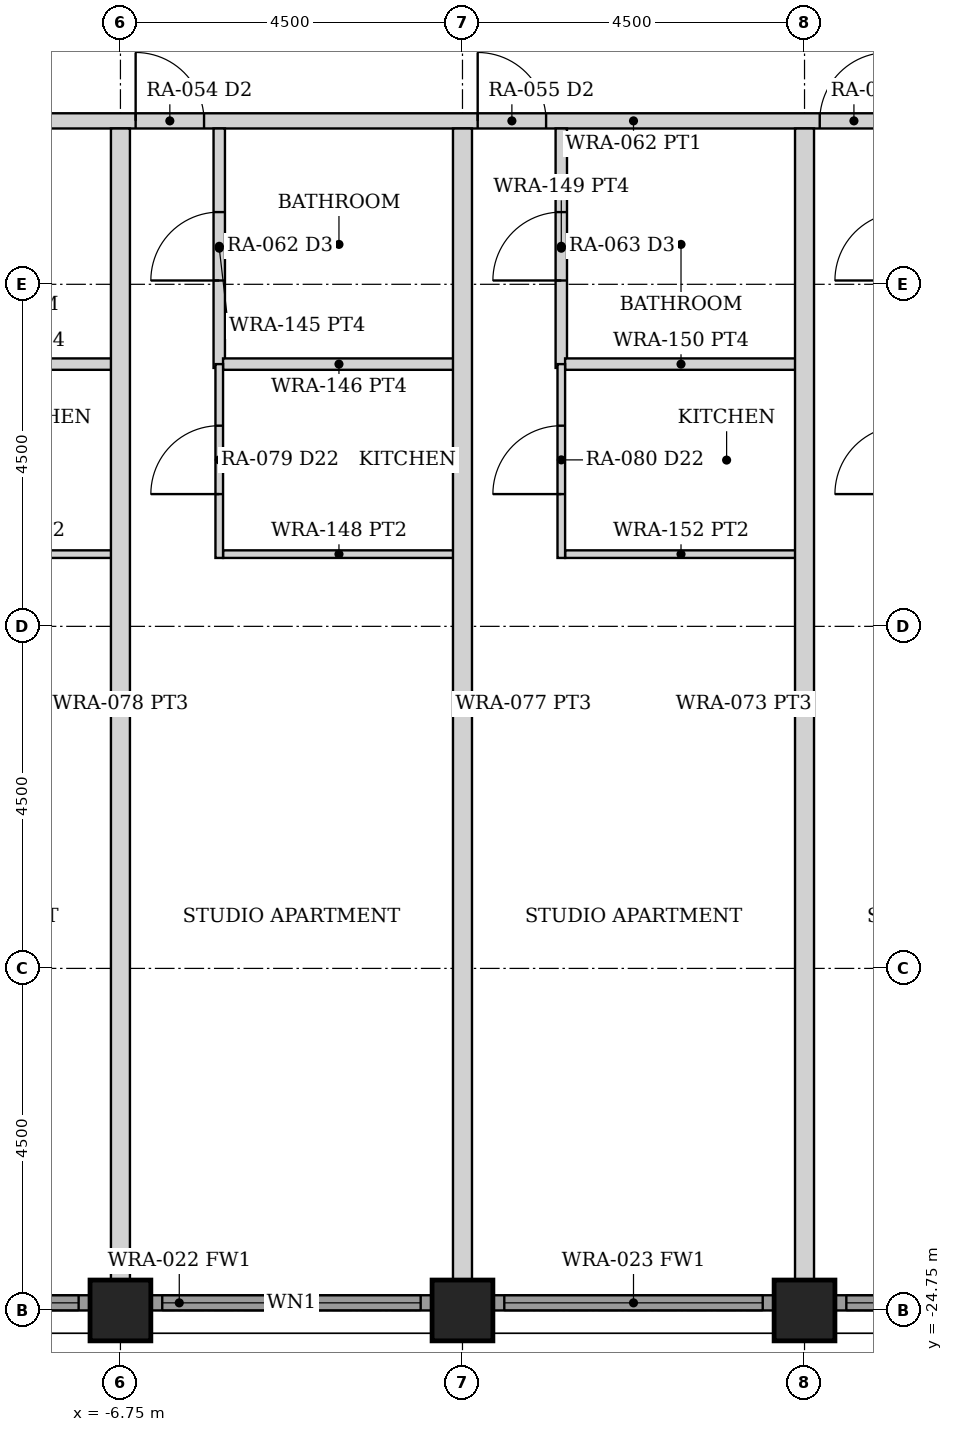
"""IFC4 building model, lengths in metres.
Left out: names, types, materials, properties, quantities, classifications, styles, units other than length and angle.
Written with IfcOpenShell. Run it as: python <this file> out.ifc"""

import sys

from ifc_helpers import new_model, si_unit, direction, frame, frame_2d, origin, origin_2d, place, context, subcontext, project, spatial, rectangle, hollow_rectangle, extrude, element, fill, save


model = new_model("IFC4")
c1 = context("Model", 3, precision=1e-05, world=origin(), true_north=direction((0.0, 1.0)))
c2 = subcontext(c1, "Body", "Model", "MODEL_VIEW")
j1 = project(units=[si_unit("LENGTHUNIT", "METRE"), si_unit("PLANEANGLEUNIT", "RADIAN")], contexts=[c1])
p1 = place(None, origin())
s1 = spatial("IfcSite", under=j1, at=p1, CompositionType="ELEMENT")
p2 = place(p1, origin())
s2 = spatial("IfcBuilding", under=s1, at=p2, CompositionType="ELEMENT")
p3 = place(p2, frame((0.0, 0.0, 26.5)))
s3 = spatial("IfcBuildingStorey", under=s2, at=p3, CompositionType="ELEMENT", Elevation=26.5)
for number, where, z_axis, x_axis in (
    (1, (-6.75, -24.75, 0.0), (0.0, 0.0, 1.0), (0.0, 1.0, 0.0)),
    (2, (-2.25, -24.75, 0.0), (0.0, 0.0, 1.0), (0.0, 1.0, 0.0)),
    (3, (2.25, -24.75, 0.0), (0.0, 0.0, 1.0), (0.0, 1.0, 0.0)),
):
    element("IfcColumn", number, at=place(p3, frame(where, z_axis=z_axis, x_axis=x_axis)), inside=s3, PredefinedType="COLUMN", context=c2, shape_type="SweptSolid", body=[
        extrude(hollow_rectangle(XDim=0.8, YDim=0.8, WallThickness=0.08, at=origin_2d()), origin(), (0.0, 0.0, 1.0), 3.5),
    ])
p4 = place(p3, frame((-10.845, -24.65, 0.0), z_axis=(0.0, 0.0, 1.0), x_axis=(1.0, 0.0, 0.0)))
e4 = element("IfcWall", 4, at=p4, inside=s3, PredefinedType="SOLIDWALL", context=c2, shape_type="SweptSolid", body=[
    extrude(rectangle(XDim=3.69, YDim=0.2, at=frame_2d((1.845, 0.0))), origin(), (0.0, 0.0, 1.0), 2.379),
])
p5 = place(p4, frame((0.145, 0.0, 0.3)))
e5 = element("IfcOpeningElement", 5, at=p5, cuts=e4, PredefinedType="OPENING", context=c2, shape_type="SweptSolid", body=[
    extrude(rectangle(XDim=3.4, YDim=1.929, at=frame_2d((1.7, 0.964))), frame((0.0, 0.11, 0.0), z_axis=(0.0, -1.0, 0.0), x_axis=(1.0, 0.0, 0.0)), (0.0, 0.0, 1.0), 0.22),
])
p6 = place(p3, frame((-6.345, -24.65, 0.0), z_axis=(0.0, 0.0, 1.0), x_axis=(1.0, 0.0, 0.0)))
e6 = element("IfcWall", 6, at=p6, inside=s3, PredefinedType="SOLIDWALL", context=c2, shape_type="SweptSolid", body=[
    extrude(rectangle(XDim=3.69, YDim=0.2, at=frame_2d((1.845, 0.0))), origin(), (0.0, 0.0, 1.0), 2.379),
])
p7 = place(p6, frame((0.145, 0.0, 0.3)))
e7 = element("IfcOpeningElement", 7, at=p7, cuts=e6, PredefinedType="OPENING", context=c2, shape_type="SweptSolid", body=[
    extrude(rectangle(XDim=3.4, YDim=1.929, at=frame_2d((1.7, 0.964))), frame((0.0, 0.11, 0.0), z_axis=(0.0, -1.0, 0.0), x_axis=(1.0, 0.0, 0.0)), (0.0, 0.0, 1.0), 0.22),
])
p8 = place(p3, frame((-1.845, -24.65, 0.0), z_axis=(0.0, 0.0, 1.0), x_axis=(1.0, 0.0, 0.0)))
e8 = element("IfcWall", 8, at=p8, inside=s3, PredefinedType="SOLIDWALL", context=c2, shape_type="SweptSolid", body=[
    extrude(rectangle(XDim=3.69, YDim=0.2, at=frame_2d((1.845, 0.0))), origin(), (0.0, 0.0, 1.0), 2.379),
])
p9 = place(p8, frame((0.145, 0.0, 0.3)))
e9 = element("IfcOpeningElement", 9, at=p9, cuts=e8, PredefinedType="OPENING", context=c2, shape_type="SweptSolid", body=[
    extrude(rectangle(XDim=3.4, YDim=1.929, at=frame_2d((1.7, 0.964))), frame((0.0, 0.11, 0.0), z_axis=(0.0, -1.0, 0.0), x_axis=(1.0, 0.0, 0.0)), (0.0, 0.0, 1.0), 0.22),
])
p10 = place(p3, frame((2.655, -24.65, 0.0), z_axis=(0.0, 0.0, 1.0), x_axis=(1.0, 0.0, 0.0)))
e10 = element("IfcWall", 10, at=p10, inside=s3, PredefinedType="SOLIDWALL", context=c2, shape_type="SweptSolid", body=[
    extrude(rectangle(XDim=3.69, YDim=0.2, at=frame_2d((1.845, 0.0))), origin(), (0.0, 0.0, 1.0), 2.379),
])
p11 = place(p10, frame((0.145, 0.0, 0.3)))
e11 = element("IfcOpeningElement", 11, at=p11, cuts=e10, PredefinedType="OPENING", context=c2, shape_type="SweptSolid", body=[
    extrude(rectangle(XDim=3.4, YDim=1.929, at=frame_2d((1.7, 0.964))), frame((0.0, 0.11, 0.0), z_axis=(0.0, -1.0, 0.0), x_axis=(1.0, 0.0, 0.0)), (0.0, 0.0, 1.0), 0.22),
])
p12 = place(p3, frame((-24.55, -9.1, 0.0), z_axis=(0.0, 0.0, 1.0), x_axis=(1.0, 0.0, 0.0)))
e12 = element("IfcWall", 12, at=p12, inside=s3, PredefinedType="PARTITIONING", context=c2, shape_type="SweptSolid", body=[
    extrude(rectangle(XDim=49.1, YDim=0.2, at=frame_2d((24.55, 0.0))), origin(), (0.0, 0.0, 1.0), 2.373),
])
p13 = place(p12, frame((5.1, 0.0, 0.0)))
e13 = element("IfcOpeningElement", 13, at=p13, cuts=e12, PredefinedType="OPENING", context=c2, shape_type="SweptSolid", body=[
    extrude(rectangle(XDim=0.9, YDim=2.1, at=frame_2d((0.45, 1.05))), frame((0.0, 0.11, 0.0), z_axis=(0.0, -1.0, 0.0), x_axis=(1.0, 0.0, 0.0)), (0.0, 0.0, 1.0), 0.22),
])
p14 = place(p12, frame((9.0, 0.0, 0.0)))
e14 = element("IfcOpeningElement", 14, at=p14, cuts=e12, PredefinedType="OPENING", context=c2, shape_type="SweptSolid", body=[
    extrude(rectangle(XDim=0.9, YDim=2.1, at=frame_2d((0.45, 1.05))), frame((0.0, 0.11, 0.0), z_axis=(0.0, -1.0, 0.0), x_axis=(1.0, 0.0, 0.0)), (0.0, 0.0, 1.0), 0.22),
])
p15 = place(p12, frame((13.5, 0.0, 0.0)))
e15 = element("IfcOpeningElement", 15, at=p15, cuts=e12, PredefinedType="OPENING", context=c2, shape_type="SweptSolid", body=[
    extrude(rectangle(XDim=0.9, YDim=2.1, at=frame_2d((0.45, 1.05))), frame((0.0, 0.11, 0.0), z_axis=(0.0, -1.0, 0.0), x_axis=(1.0, 0.0, 0.0)), (0.0, 0.0, 1.0), 0.22),
])
p16 = place(p12, frame((18.0, 0.0, 0.0)))
e16 = element("IfcOpeningElement", 16, at=p16, cuts=e12, PredefinedType="OPENING", context=c2, shape_type="SweptSolid", body=[
    extrude(rectangle(XDim=0.9, YDim=2.1, at=frame_2d((0.45, 1.05))), frame((0.0, 0.11, 0.0), z_axis=(0.0, -1.0, 0.0), x_axis=(1.0, 0.0, 0.0)), (0.0, 0.0, 1.0), 0.22),
])
p17 = place(p12, frame((22.5, 0.0, 0.0)))
e17 = element("IfcOpeningElement", 17, at=p17, cuts=e12, PredefinedType="OPENING", context=c2, shape_type="SweptSolid", body=[
    extrude(rectangle(XDim=0.9, YDim=2.1, at=frame_2d((0.45, 1.05))), frame((0.0, 0.11, 0.0), z_axis=(0.0, -1.0, 0.0), x_axis=(1.0, 0.0, 0.0)), (0.0, 0.0, 1.0), 0.22),
])
p18 = place(p12, frame((27.0, 0.0, 0.0)))
e18 = element("IfcOpeningElement", 18, at=p18, cuts=e12, PredefinedType="OPENING", context=c2, shape_type="SweptSolid", body=[
    extrude(rectangle(XDim=0.9, YDim=2.1, at=frame_2d((0.45, 1.05))), frame((0.0, 0.11, 0.0), z_axis=(0.0, -1.0, 0.0), x_axis=(1.0, 0.0, 0.0)), (0.0, 0.0, 1.0), 0.22),
])
p19 = place(p12, frame((31.5, 0.0, 0.0)))
e19 = element("IfcOpeningElement", 19, at=p19, cuts=e12, PredefinedType="OPENING", context=c2, shape_type="SweptSolid", body=[
    extrude(rectangle(XDim=0.9, YDim=2.1, at=frame_2d((0.45, 1.05))), frame((0.0, 0.11, 0.0), z_axis=(0.0, -1.0, 0.0), x_axis=(1.0, 0.0, 0.0)), (0.0, 0.0, 1.0), 0.22),
])
p20 = place(p12, frame((36.0, 0.0, 0.0)))
e20 = element("IfcOpeningElement", 20, at=p20, cuts=e12, PredefinedType="OPENING", context=c2, shape_type="SweptSolid", body=[
    extrude(rectangle(XDim=0.9, YDim=2.1, at=frame_2d((0.45, 1.05))), frame((0.0, 0.11, 0.0), z_axis=(0.0, -1.0, 0.0), x_axis=(1.0, 0.0, 0.0)), (0.0, 0.0, 1.0), 0.22),
])
p21 = place(p12, frame((43.1, 0.0, 0.0)))
e21 = element("IfcOpeningElement", 21, at=p21, cuts=e12, PredefinedType="OPENING", context=c2, shape_type="SweptSolid", body=[
    extrude(rectangle(XDim=0.9, YDim=2.1, at=frame_2d((0.45, 1.05))), frame((0.0, 0.11, 0.0), z_axis=(0.0, -1.0, 0.0), x_axis=(1.0, 0.0, 0.0)), (0.0, 0.0, 1.0), 0.22),
])
p22 = place(p3, frame((-9.9, -12.3, 0.0), z_axis=(0.0, 0.0, 1.0), x_axis=(1.0, 0.0, 0.0)))
e22 = element("IfcWall", 22, at=p22, inside=s3, PredefinedType="PARTITIONING", context=c2, shape_type="SweptSolid", body=[
    extrude(rectangle(XDim=3.05, YDim=0.15, at=frame_2d((1.525, 0.0))), origin(), (0.0, 0.0, 1.0), 2.373),
])
p23 = place(p3, frame((-9.9, -14.8, 0.0), z_axis=(0.0, 0.0, 1.0), x_axis=(1.0, 0.0, 0.0)))
e23 = element("IfcWall", 23, at=p23, inside=s3, PredefinedType="PARTITIONING", context=c2, shape_type="SweptSolid", body=[
    extrude(rectangle(XDim=3.05, YDim=0.1, at=frame_2d((1.525, 0.0))), origin(), (0.0, 0.0, 1.0), 2.373),
])
p24 = place(p3, frame((-5.45, -12.35, 0.0), z_axis=(0.0, 0.0, 1.0), x_axis=(0.0, 1.0, 0.0)))
e24 = element("IfcWall", 24, at=p24, inside=s3, PredefinedType="PARTITIONING", context=c2, shape_type="SweptSolid", body=[
    extrude(rectangle(XDim=3.15, YDim=0.15, at=frame_2d((1.575, 0.0))), origin(), (0.0, 0.0, 1.0), 2.373),
])
p25 = place(p24, frame((1.15, 0.0, 0.0)))
e25 = element("IfcOpeningElement", 25, at=p25, cuts=e24, PredefinedType="OPENING", context=c2, shape_type="SweptSolid", body=[
    extrude(rectangle(XDim=0.9, YDim=2.1, at=frame_2d((0.45, 1.05))), frame((0.0, 0.085, 0.0), z_axis=(0.0, -1.0, 0.0), x_axis=(1.0, 0.0, 0.0)), (0.0, 0.0, 1.0), 0.17),
])
p26 = place(p3, frame((-5.4, -12.3, 0.0), z_axis=(0.0, 0.0, 1.0), x_axis=(1.0, 0.0, 0.0)))
e26 = element("IfcWall", 26, at=p26, inside=s3, PredefinedType="PARTITIONING", context=c2, shape_type="SweptSolid", body=[
    extrude(rectangle(XDim=3.05, YDim=0.15, at=frame_2d((1.525, 0.0))), origin(), (0.0, 0.0, 1.0), 2.373),
])
p27 = place(p3, frame((-5.4, -14.8, 0.0), z_axis=(0.0, 0.0, 1.0), x_axis=(1.0, 0.0, 0.0)))
e27 = element("IfcWall", 27, at=p27, inside=s3, PredefinedType="PARTITIONING", context=c2, shape_type="SweptSolid", body=[
    extrude(rectangle(XDim=3.05, YDim=0.1, at=frame_2d((1.525, 0.0))), origin(), (0.0, 0.0, 1.0), 2.373),
])
p28 = place(p3, frame((-5.45, -14.85, 0.0), z_axis=(0.0, 0.0, 1.0), x_axis=(0.0, 1.0, 0.0)))
e28 = element("IfcWall", 28, at=p28, inside=s3, PredefinedType="PARTITIONING", context=c2, shape_type="SweptSolid", body=[
    extrude(rectangle(XDim=2.55, YDim=0.1, at=frame_2d((1.275, 0.0))), origin(), (0.0, 0.0, 1.0), 2.373),
])
p29 = place(p28, frame((0.84, 0.0, 0.0)))
e29 = element("IfcOpeningElement", 29, at=p29, cuts=e28, PredefinedType="OPENING", context=c2, shape_type="SweptSolid", body=[
    extrude(rectangle(XDim=0.9, YDim=2.1, at=frame_2d((0.45, 1.05))), frame((0.0, 0.06, 0.0), z_axis=(0.0, -1.0, 0.0), x_axis=(1.0, 0.0, 0.0)), (0.0, 0.0, 1.0), 0.12),
])
p30 = place(p3, frame((-0.95, -12.35, 0.0), z_axis=(0.0, 0.0, 1.0), x_axis=(0.0, 1.0, 0.0)))
e30 = element("IfcWall", 30, at=p30, inside=s3, PredefinedType="PARTITIONING", context=c2, shape_type="SweptSolid", body=[
    extrude(rectangle(XDim=3.15, YDim=0.15, at=frame_2d((1.575, 0.0))), origin(), (0.0, 0.0, 1.0), 2.373),
])
p31 = place(p30, frame((1.15, 0.0, 0.0)))
e31 = element("IfcOpeningElement", 31, at=p31, cuts=e30, PredefinedType="OPENING", context=c2, shape_type="SweptSolid", body=[
    extrude(rectangle(XDim=0.9, YDim=2.1, at=frame_2d((0.45, 1.05))), frame((0.0, 0.085, 0.0), z_axis=(0.0, -1.0, 0.0), x_axis=(1.0, 0.0, 0.0)), (0.0, 0.0, 1.0), 0.17),
])
p32 = place(p3, frame((-0.9, -12.3, 0.0), z_axis=(0.0, 0.0, 1.0), x_axis=(1.0, 0.0, 0.0)))
e32 = element("IfcWall", 32, at=p32, inside=s3, PredefinedType="PARTITIONING", context=c2, shape_type="SweptSolid", body=[
    extrude(rectangle(XDim=3.05, YDim=0.15, at=frame_2d((1.525, 0.0))), origin(), (0.0, 0.0, 1.0), 2.373),
])
p33 = place(p3, frame((-0.9, -14.8, 0.0), z_axis=(0.0, 0.0, 1.0), x_axis=(1.0, 0.0, 0.0)))
e33 = element("IfcWall", 33, at=p33, inside=s3, PredefinedType="PARTITIONING", context=c2, shape_type="SweptSolid", body=[
    extrude(rectangle(XDim=3.05, YDim=0.1, at=frame_2d((1.525, 0.0))), origin(), (0.0, 0.0, 1.0), 2.373),
])
p34 = place(p3, frame((-0.95, -14.85, 0.0), z_axis=(0.0, 0.0, 1.0), x_axis=(0.0, 1.0, 0.0)))
e34 = element("IfcWall", 34, at=p34, inside=s3, PredefinedType="PARTITIONING", context=c2, shape_type="SweptSolid", body=[
    extrude(rectangle(XDim=2.55, YDim=0.1, at=frame_2d((1.275, 0.0))), origin(), (0.0, 0.0, 1.0), 2.373),
])
p35 = place(p34, frame((0.84, 0.0, 0.0)))
e35 = element("IfcOpeningElement", 35, at=p35, cuts=e34, PredefinedType="OPENING", context=c2, shape_type="SweptSolid", body=[
    extrude(rectangle(XDim=0.9, YDim=2.1, at=frame_2d((0.45, 1.05))), frame((0.0, 0.06, 0.0), z_axis=(0.0, -1.0, 0.0), x_axis=(1.0, 0.0, 0.0)), (0.0, 0.0, 1.0), 0.12),
])
for number, where, z_axis, x_axis in (
    (36, (-6.75, -24.35, 0.0), (0.0, 0.0, 1.0), (0.0, 1.0, 0.0)),
    (37, (-2.25, -24.35, 0.0), (0.0, 0.0, 1.0), (0.0, 1.0, 0.0)),
    (38, (2.25, -24.35, 0.0), (0.0, 0.0, 1.0), (0.0, 1.0, 0.0)),
):
    element("IfcWall", number, at=place(p3, frame(where, z_axis=z_axis, x_axis=x_axis)), inside=s3, PredefinedType="PARTITIONING", context=c2, shape_type="SweptSolid", body=[
        extrude(rectangle(XDim=15.15, YDim=0.25, at=frame_2d((7.575, 0.0))), origin(), (0.0, 0.0, 1.0), 2.373),
    ])
p36 = place(p5, origin())
e39 = element("IfcWindow", 39, at=p36, inside=s3, PartitioningType="SINGLE_PANEL", PredefinedType="WINDOW", context=c2, shape_type="SweptSolid", body=[
    extrude(rectangle(XDim=3.4, YDim=1.929, at=frame_2d((1.7, 0.964))), frame((0.0, 0.03, 0.0), z_axis=(0.0, -1.0, 0.0), x_axis=(1.0, 0.0, 0.0)), (0.0, 0.0, 1.0), 0.06),
])
fill(e5, e39)
p37 = place(p7, origin())
e40 = element("IfcWindow", 40, at=p37, inside=s3, PartitioningType="SINGLE_PANEL", PredefinedType="WINDOW", context=c2, shape_type="SweptSolid", body=[
    extrude(rectangle(XDim=3.4, YDim=1.929, at=frame_2d((1.7, 0.964))), frame((0.0, 0.03, 0.0), z_axis=(0.0, -1.0, 0.0), x_axis=(1.0, 0.0, 0.0)), (0.0, 0.0, 1.0), 0.06),
])
fill(e7, e40)
p38 = place(p9, origin())
e41 = element("IfcWindow", 41, at=p38, inside=s3, PartitioningType="SINGLE_PANEL", PredefinedType="WINDOW", context=c2, shape_type="SweptSolid", body=[
    extrude(rectangle(XDim=3.4, YDim=1.929, at=frame_2d((1.7, 0.964))), frame((0.0, 0.03, 0.0), z_axis=(0.0, -1.0, 0.0), x_axis=(1.0, 0.0, 0.0)), (0.0, 0.0, 1.0), 0.06),
])
fill(e9, e41)
p39 = place(p11, origin())
e42 = element("IfcWindow", 42, at=p39, inside=s3, PartitioningType="SINGLE_PANEL", PredefinedType="WINDOW", context=c2, shape_type="SweptSolid", body=[
    extrude(rectangle(XDim=3.4, YDim=1.929, at=frame_2d((1.7, 0.964))), frame((0.0, 0.03, 0.0), z_axis=(0.0, -1.0, 0.0), x_axis=(1.0, 0.0, 0.0)), (0.0, 0.0, 1.0), 0.06),
])
fill(e11, e42)
p40 = place(p16, origin())
e43 = element("IfcDoor", 43, at=p40, inside=s3, OperationType="SINGLE_SWING_LEFT", PredefinedType="DOOR", context=c2, shape_type="SweptSolid", body=[
    extrude(rectangle(XDim=0.9, YDim=2.1, at=frame_2d((0.45, 1.05))), frame((0.0, 0.025, 0.0), z_axis=(0.0, -1.0, 0.0), x_axis=(1.0, 0.0, 0.0)), (0.0, 0.0, 1.0), 0.05),
])
fill(e16, e43)
p41 = place(p25, origin())
e44 = element("IfcDoor", 44, at=p41, inside=s3, OperationType="SINGLE_SWING_LEFT", PredefinedType="DOOR", context=c2, shape_type="SweptSolid", body=[
    extrude(rectangle(XDim=0.9, YDim=2.1, at=frame_2d((0.45, 1.05))), frame((0.0, 0.025, 0.0), z_axis=(0.0, -1.0, 0.0), x_axis=(1.0, 0.0, 0.0)), (0.0, 0.0, 1.0), 0.05),
])
fill(e25, e44)
p42 = place(p29, origin())
e45 = element("IfcDoor", 45, at=p42, inside=s3, OperationType="SINGLE_SWING_LEFT", PredefinedType="DOOR", context=c2, shape_type="SweptSolid", body=[
    extrude(rectangle(XDim=0.9, YDim=2.1, at=frame_2d((0.45, 1.05))), frame((0.0, 0.025, 0.0), z_axis=(0.0, -1.0, 0.0), x_axis=(1.0, 0.0, 0.0)), (0.0, 0.0, 1.0), 0.05),
])
fill(e29, e45)
p43 = place(p17, origin())
e46 = element("IfcDoor", 46, at=p43, inside=s3, OperationType="SINGLE_SWING_LEFT", PredefinedType="DOOR", context=c2, shape_type="SweptSolid", body=[
    extrude(rectangle(XDim=0.9, YDim=2.1, at=frame_2d((0.45, 1.05))), frame((0.0, 0.025, 0.0), z_axis=(0.0, -1.0, 0.0), x_axis=(1.0, 0.0, 0.0)), (0.0, 0.0, 1.0), 0.05),
])
fill(e17, e46)
p44 = place(p31, origin())
e47 = element("IfcDoor", 47, at=p44, inside=s3, OperationType="SINGLE_SWING_LEFT", PredefinedType="DOOR", context=c2, shape_type="SweptSolid", body=[
    extrude(rectangle(XDim=0.9, YDim=2.1, at=frame_2d((0.45, 1.05))), frame((0.0, 0.025, 0.0), z_axis=(0.0, -1.0, 0.0), x_axis=(1.0, 0.0, 0.0)), (0.0, 0.0, 1.0), 0.05),
])
fill(e31, e47)
p45 = place(p35, origin())
e48 = element("IfcDoor", 48, at=p45, inside=s3, OperationType="SINGLE_SWING_LEFT", PredefinedType="DOOR", context=c2, shape_type="SweptSolid", body=[
    extrude(rectangle(XDim=0.9, YDim=2.1, at=frame_2d((0.45, 1.05))), frame((0.0, 0.025, 0.0), z_axis=(0.0, -1.0, 0.0), x_axis=(1.0, 0.0, 0.0)), (0.0, 0.0, 1.0), 0.05),
])
fill(e35, e48)
p46 = place(p18, origin())
e49 = element("IfcDoor", 49, at=p46, inside=s3, OperationType="SINGLE_SWING_RIGHT", PredefinedType="DOOR", context=c2, shape_type="SweptSolid", body=[
    extrude(rectangle(XDim=0.9, YDim=2.1, at=frame_2d((0.45, 1.05))), frame((0.0, 0.025, 0.0), z_axis=(0.0, -1.0, 0.0), x_axis=(1.0, 0.0, 0.0)), (0.0, 0.0, 1.0), 0.05),
])
fill(e18, e49)
save(model, sys.argv[1])
